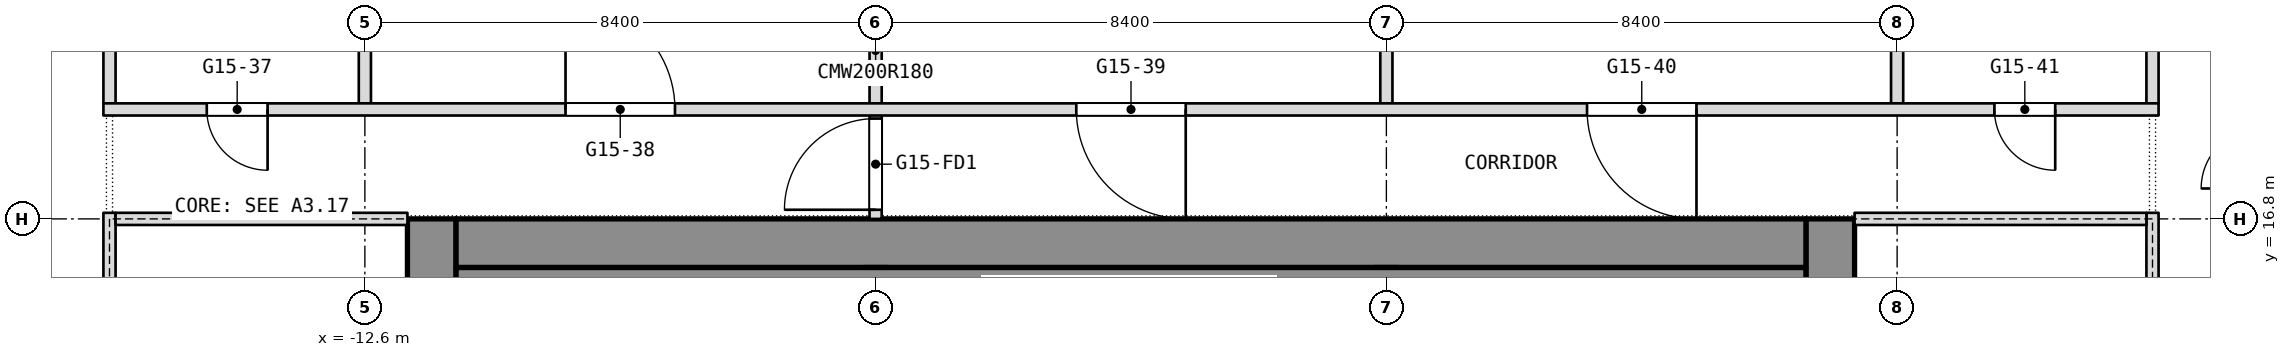
"""IFC4 building model, lengths in metres.
Left out: names, types, materials, properties, quantities, classifications, styles, units other than length and angle.
Written with IfcOpenShell. Run it as: python <this file> out.ifc"""

import sys

from ifc_helpers import new_model, si_unit, direction, frame, frame_2d, origin, place, context, subcontext, project, spatial, rectangle, extrude, element, fill, save


model = new_model("IFC4")
c1 = context("Model", 3, precision=1e-05, world=origin(), true_north=direction((0.0, 1.0)))
c2 = subcontext(c1, "Body", "Model", "MODEL_VIEW")
j1 = project(units=[si_unit("LENGTHUNIT", "METRE"), si_unit("PLANEANGLEUNIT", "RADIAN")], contexts=[c1])
p1 = place(None, origin())
s1 = spatial("IfcSite", under=j1, at=p1, CompositionType="ELEMENT")
p2 = place(p1, origin())
s2 = spatial("IfcBuilding", under=s1, at=p2, CompositionType="ELEMENT")
p3 = place(p2, frame((0.0, 0.0, 187.7)))
s3 = spatial("IfcBuildingStorey", under=s2, at=p3, CompositionType="ELEMENT", Elevation=187.7)
p4 = place(p3, frame((11.5, 0.0, 0.0), z_axis=(0.0, 0.0, 1.0), x_axis=(0.0, 1.0, 0.0)))
e1 = element("IfcWall", 1, at=p4, inside=s3, PredefinedType="SHEAR", context=c2, shape_type="SweptSolid", body=[
    extrude(rectangle(XDim=16.8, YDim=0.8, at=frame_2d((8.4, 0.0))), origin(), (0.0, 0.0, 1.0), 3.6),
])
p5 = place(p4, frame((2.3, 0.0, 0.0)))
e2 = element("IfcOpeningElement", 2, at=p5, cuts=e1, PredefinedType="OPENING", context=c2, shape_type="SweptSolid", body=[
    extrude(rectangle(XDim=1.1, YDim=2.1, at=frame_2d((0.55, 1.05))), frame((0.0, 0.4, 0.0), z_axis=(0.0, -1.0, 0.0), x_axis=(1.0, 0.0, 0.0)), (0.0, 0.0, 1.0), 0.8),
])
p6 = place(p4, frame((4.85, 0.0, 0.0)))
e3 = element("IfcOpeningElement", 3, at=p6, cuts=e1, PredefinedType="OPENING", context=c2, shape_type="SweptSolid", body=[
    extrude(rectangle(XDim=1.1, YDim=2.1, at=frame_2d((0.55, 1.05))), frame((0.0, 0.4, 0.0), z_axis=(0.0, -1.0, 0.0), x_axis=(1.0, 0.0, 0.0)), (0.0, 0.0, 1.0), 0.8),
])
p7 = place(p4, frame((6.825, 0.0, 0.0)))
e4 = element("IfcOpeningElement", 4, at=p7, cuts=e1, PredefinedType="OPENING", context=c2, shape_type="SweptSolid", body=[
    extrude(rectangle(XDim=1.2, YDim=2.1, at=frame_2d((0.6, 1.05))), frame((0.0, 0.4, 0.0), z_axis=(0.0, -1.0, 0.0), x_axis=(1.0, 0.0, 0.0)), (0.0, 0.0, 1.0), 0.8),
])
p8 = place(p4, frame((13.4, 0.0, 0.0)))
e5 = element("IfcOpeningElement", 5, at=p8, cuts=e1, PredefinedType="OPENING", context=c2, shape_type="SweptSolid", body=[
    extrude(rectangle(XDim=1.1, YDim=2.1, at=frame_2d((0.55, 1.05))), frame((0.0, 0.4, 0.0), z_axis=(0.0, -1.0, 0.0), x_axis=(1.0, 0.0, 0.0)), (0.0, 0.0, 1.0), 0.8),
])
p9 = place(p4, frame((10.85, 0.0, 0.0)))
e6 = element("IfcOpeningElement", 6, at=p9, cuts=e1, PredefinedType="OPENING", context=c2, shape_type="SweptSolid", body=[
    extrude(rectangle(XDim=1.1, YDim=2.1, at=frame_2d((0.55, 1.05))), frame((0.0, 0.4, 0.0), z_axis=(0.0, -1.0, 0.0), x_axis=(1.0, 0.0, 0.0)), (0.0, 0.0, 1.0), 0.8),
])
p10 = place(p4, frame((8.775, 0.0, 0.0)))
e7 = element("IfcOpeningElement", 7, at=p10, cuts=e1, PredefinedType="OPENING", context=c2, shape_type="SweptSolid", body=[
    extrude(rectangle(XDim=1.2, YDim=2.1, at=frame_2d((0.6, 1.05))), frame((0.0, 0.4, 0.0), z_axis=(0.0, -1.0, 0.0), x_axis=(1.0, 0.0, 0.0)), (0.0, 0.0, 1.0), 0.8),
])
p11 = place(p3, frame((-11.5, 0.0, 0.0), z_axis=(0.0, 0.0, 1.0), x_axis=(0.0, 1.0, 0.0)))
e8 = element("IfcWall", 8, at=p11, inside=s3, PredefinedType="SHEAR", context=c2, shape_type="SweptSolid", body=[
    extrude(rectangle(XDim=16.8, YDim=0.8, at=frame_2d((8.4, 0.0))), origin(), (0.0, 0.0, 1.0), 3.6),
])
p12 = place(p11, frame((3.6, 0.0, 0.0)))
e9 = element("IfcOpeningElement", 9, at=p12, cuts=e8, PredefinedType="OPENING", context=c2, shape_type="SweptSolid", body=[
    extrude(rectangle(XDim=0.9, YDim=2.1, at=frame_2d((0.45, 1.05))), frame((0.0, 0.4, 0.0), z_axis=(0.0, -1.0, 0.0), x_axis=(1.0, 0.0, 0.0)), (0.0, 0.0, 1.0), 0.8),
])
p13 = place(p11, frame((6.825, 0.0, 0.0)))
e10 = element("IfcOpeningElement", 10, at=p13, cuts=e8, PredefinedType="OPENING", context=c2, shape_type="SweptSolid", body=[
    extrude(rectangle(XDim=1.2, YDim=2.1, at=frame_2d((0.6, 1.05))), frame((0.0, 0.4, 0.0), z_axis=(0.0, -1.0, 0.0), x_axis=(1.0, 0.0, 0.0)), (0.0, 0.0, 1.0), 0.8),
])
p14 = place(p11, frame((14.212, 0.0, 0.0)))
e11 = element("IfcOpeningElement", 11, at=p14, cuts=e8, PredefinedType="OPENING", context=c2, shape_type="SweptSolid", body=[
    extrude(rectangle(XDim=0.9, YDim=2.1, at=frame_2d((0.45, 1.05))), frame((0.0, 0.4, 0.0), z_axis=(0.0, -1.0, 0.0), x_axis=(1.0, 0.0, 0.0)), (0.0, 0.0, 1.0), 0.8),
])
p15 = place(p11, frame((11.587, 0.0, 0.0)))
e12 = element("IfcOpeningElement", 12, at=p15, cuts=e8, PredefinedType="OPENING", context=c2, shape_type="SweptSolid", body=[
    extrude(rectangle(XDim=0.9, YDim=2.1, at=frame_2d((0.45, 1.05))), frame((0.0, 0.4, 0.0), z_axis=(0.0, -1.0, 0.0), x_axis=(1.0, 0.0, 0.0)), (0.0, 0.0, 1.0), 0.8),
])
p16 = place(p11, frame((8.775, 0.0, 0.0)))
e13 = element("IfcOpeningElement", 13, at=p16, cuts=e8, PredefinedType="OPENING", context=c2, shape_type="SweptSolid", body=[
    extrude(rectangle(XDim=1.2, YDim=2.1, at=frame_2d((0.6, 1.05))), frame((0.0, 0.4, 0.0), z_axis=(0.0, -1.0, 0.0), x_axis=(1.0, 0.0, 0.0)), (0.0, 0.0, 1.0), 0.8),
])
p17 = place(p3, frame((-11.1, 16.4, 0.0), z_axis=(0.0, 0.0, 1.0), x_axis=(1.0, 0.0, 0.0)))
e14 = element("IfcWall", 14, at=p17, inside=s3, PredefinedType="SHEAR", context=c2, shape_type="SweptSolid", body=[
    extrude(rectangle(XDim=22.2, YDim=0.8, at=frame_2d((11.1, 0.0))), origin(), (0.0, 0.0, 1.0), 3.6),
])
p18 = place(p3, frame((-4.2, 0.8, 0.0), z_axis=(0.0, 0.0, 1.0), x_axis=(0.0, 1.0, 0.0)))
e15 = element("IfcWall", 15, at=p18, inside=s3, PredefinedType="SHEAR", context=c2, shape_type="SweptSolid", body=[
    extrude(rectangle(XDim=15.2, YDim=0.4, at=frame_2d((7.6, 0.0))), origin(), (0.0, 0.0, 1.0), 3.6),
])
p19 = place(p18, frame((8.5, 0.0, 0.0)))
e16 = element("IfcOpeningElement", 16, at=p19, cuts=e15, PredefinedType="OPENING", context=c2, shape_type="SweptSolid", body=[
    extrude(rectangle(XDim=1.2, YDim=2.1, at=frame_2d((0.6, 1.05))), frame((0.0, 0.2, 0.0), z_axis=(0.0, -1.0, 0.0), x_axis=(1.0, 0.0, 0.0)), (0.0, 0.0, 1.0), 0.4),
])
p20 = place(p3, frame((4.2, 0.8, 0.0), z_axis=(0.0, 0.0, 1.0), x_axis=(0.0, 1.0, 0.0)))
e17 = element("IfcWall", 17, at=p20, inside=s3, PredefinedType="SHEAR", context=c2, shape_type="SweptSolid", body=[
    extrude(rectangle(XDim=15.2, YDim=0.4, at=frame_2d((7.6, 0.0))), origin(), (0.0, 0.0, 1.0), 3.6),
])
p21 = place(p20, frame((5.95, 0.0, 0.0)))
e18 = element("IfcOpeningElement", 18, at=p21, cuts=e17, PredefinedType="OPENING", context=c2, shape_type="SweptSolid", body=[
    extrude(rectangle(XDim=1.2, YDim=2.1, at=frame_2d((0.6, 1.05))), frame((0.0, 0.2, 0.0), z_axis=(0.0, -1.0, 0.0), x_axis=(1.0, 0.0, 0.0)), (0.0, 0.0, 1.0), 0.4),
])
for number, where, z_axis, x_axis in (
    (19, (16.8, 18.7, 0.0), (0.0, 0.0, 1.0), (0.0, 1.0, 0.0)),
    (20, (12.6, 18.7, 0.0), (0.0, 0.0, 1.0), (0.0, 1.0, 0.0)),
    (21, (4.2, 18.7, 0.0), (0.0, 0.0, 1.0), (0.0, 1.0, 0.0)),
):
    element("IfcWall", number, at=place(p3, frame(where, z_axis=z_axis, x_axis=x_axis)), inside=s3, PredefinedType="PARTITIONING", context=c2, shape_type="SweptSolid", body=[
        extrude(rectangle(XDim=3.64, YDim=0.2, at=frame_2d((1.82, 0.0))), origin(), (0.0, 0.0, 1.0), 3.34),
    ])
p22 = place(p3, frame((-4.2, 16.8, 0.0), z_axis=(0.0, 0.0, 1.0), x_axis=(0.0, 1.0, 0.0)))
e22 = element("IfcWall", 22, at=p22, inside=s3, PredefinedType="PARTITIONING", context=c2, shape_type="SweptSolid", body=[
    extrude(rectangle(XDim=5.54, YDim=0.2, at=frame_2d((2.77, 0.0))), origin(), (0.0, 0.0, 1.0), 3.34),
])
p23 = place(p22, frame((0.15, 0.0, 0.0)))
e23 = element("IfcOpeningElement", 23, at=p23, cuts=e22, PredefinedType="OPENING", context=c2, shape_type="SweptSolid", body=[
    extrude(rectangle(XDim=1.5, YDim=2.1, at=frame_2d((0.75, 1.05))), frame((0.0, 0.1, 0.0), z_axis=(0.0, -1.0, 0.0), x_axis=(1.0, 0.0, 0.0)), (0.0, 0.0, 1.0), 0.2),
])
for number, where, z_axis, x_axis in (
    (24, (-12.6, 18.7, 0.0), (0.0, 0.0, 1.0), (0.0, 1.0, 0.0)),
    (25, (-16.8, 18.7, 0.0), (0.0, 0.0, 1.0), (0.0, 1.0, 0.0)),
):
    element("IfcWall", number, at=place(p3, frame(where, z_axis=z_axis, x_axis=x_axis)), inside=s3, PredefinedType="PARTITIONING", context=c2, shape_type="SweptSolid", body=[
        extrude(rectangle(XDim=3.64, YDim=0.2, at=frame_2d((1.82, 0.0))), origin(), (0.0, 0.0, 1.0), 3.34),
    ])
p24 = place(p3, frame((-16.9, 18.6, 0.0), z_axis=(0.0, 0.0, 1.0), x_axis=(1.0, 0.0, 0.0)))
e26 = element("IfcWall", 26, at=p24, inside=s3, PredefinedType="PARTITIONING", context=c2, shape_type="SweptSolid", body=[
    extrude(rectangle(XDim=33.8, YDim=0.2, at=frame_2d((16.9, 0.0))), origin(), (0.0, 0.0, 1.0), 3.34),
])
p25 = place(p24, frame((1.7, 0.0, 0.0)))
e27 = element("IfcOpeningElement", 27, at=p25, cuts=e26, PredefinedType="OPENING", context=c2, shape_type="SweptSolid", body=[
    extrude(rectangle(XDim=1.0, YDim=2.1, at=frame_2d((0.5, 1.05))), frame((0.0, 0.1, 0.0), z_axis=(0.0, -1.0, 0.0), x_axis=(1.0, 0.0, 0.0)), (0.0, 0.0, 1.0), 0.2),
])
p26 = place(p24, frame((7.6, 0.0, 0.0)))
e28 = element("IfcOpeningElement", 28, at=p26, cuts=e26, PredefinedType="OPENING", context=c2, shape_type="SweptSolid", body=[
    extrude(rectangle(XDim=1.8, YDim=2.1, at=frame_2d((0.9, 1.05))), frame((0.0, 0.1, 0.0), z_axis=(0.0, -1.0, 0.0), x_axis=(1.0, 0.0, 0.0)), (0.0, 0.0, 1.0), 0.2),
])
p27 = place(p24, frame((16.0, 0.0, 0.0)))
e29 = element("IfcOpeningElement", 29, at=p27, cuts=e26, PredefinedType="OPENING", context=c2, shape_type="SweptSolid", body=[
    extrude(rectangle(XDim=1.8, YDim=2.1, at=frame_2d((0.9, 1.05))), frame((0.0, 0.1, 0.0), z_axis=(0.0, -1.0, 0.0), x_axis=(1.0, 0.0, 0.0)), (0.0, 0.0, 1.0), 0.2),
])
p28 = place(p24, frame((24.4, 0.0, 0.0)))
e30 = element("IfcOpeningElement", 30, at=p28, cuts=e26, PredefinedType="OPENING", context=c2, shape_type="SweptSolid", body=[
    extrude(rectangle(XDim=1.8, YDim=2.1, at=frame_2d((0.9, 1.05))), frame((0.0, 0.1, 0.0), z_axis=(0.0, -1.0, 0.0), x_axis=(1.0, 0.0, 0.0)), (0.0, 0.0, 1.0), 0.2),
])
p29 = place(p24, frame((31.1, 0.0, 0.0)))
e31 = element("IfcOpeningElement", 31, at=p29, cuts=e26, PredefinedType="OPENING", context=c2, shape_type="SweptSolid", body=[
    extrude(rectangle(XDim=1.0, YDim=2.1, at=frame_2d((0.5, 1.05))), frame((0.0, 0.1, 0.0), z_axis=(0.0, -1.0, 0.0), x_axis=(1.0, 0.0, 0.0)), (0.0, 0.0, 1.0), 0.2),
])
p30 = place(p3, frame((-11.1, 15.65, 0.0), z_axis=(0.0, 0.0, 1.0), x_axis=(1.0, 0.0, 0.0)))
e32 = element("IfcWall", 32, at=p30, inside=s3, PredefinedType="PARTITIONING", context=c2, shape_type="SweptSolid", body=[
    extrude(rectangle(XDim=22.2, YDim=0.7, at=frame_2d((11.1, 0.0))), origin(), (0.0, 0.0, 1.0), 3.34),
])
p31 = place(p3, frame((-16.8, -0.1, 0.0), z_axis=(0.0, 0.0, 1.0), x_axis=(0.0, 1.0, 0.0)))
e33 = element("IfcWall", 33, at=p31, inside=s3, PredefinedType="PARTITIONING", context=c2, shape_type="SweptSolid", body=[
    extrude(rectangle(XDim=17.0, YDim=0.2, at=frame_2d((8.5, 0.0))), origin(), (0.0, 0.0, 1.0), 3.34),
])
p32 = place(p31, frame((2.2, 0.0, 0.0)))
e34 = element("IfcOpeningElement", 34, at=p32, cuts=e33, PredefinedType="OPENING", context=c2, shape_type="SweptSolid", body=[
    extrude(rectangle(XDim=1.8, YDim=2.1, at=frame_2d((0.9, 1.05))), frame((0.0, 0.1, 0.0), z_axis=(0.0, -1.0, 0.0), x_axis=(1.0, 0.0, 0.0)), (0.0, 0.0, 1.0), 0.2),
])
p33 = place(p31, frame((13.0, 0.0, 0.0)))
e35 = element("IfcOpeningElement", 35, at=p33, cuts=e33, PredefinedType="OPENING", context=c2, shape_type="SweptSolid", body=[
    extrude(rectangle(XDim=1.8, YDim=2.1, at=frame_2d((0.9, 1.05))), frame((0.0, 0.1, 0.0), z_axis=(0.0, -1.0, 0.0), x_axis=(1.0, 0.0, 0.0)), (0.0, 0.0, 1.0), 0.2),
])
p34 = place(p3, frame((-16.7, 16.8, 0.0), z_axis=(0.0, 0.0, 1.0), x_axis=(1.0, 0.0, 0.0)))
e36 = element("IfcWall", 36, at=p34, inside=s3, PredefinedType="PARTITIONING", context=c2, shape_type="SweptSolid", body=[
    extrude(rectangle(XDim=4.8, YDim=0.2, at=frame_2d((2.4, 0.0))), origin(), (0.0, 0.0, 1.0), 2.94),
])
p35 = place(p3, frame((16.8, -0.1, 0.0), z_axis=(0.0, 0.0, 1.0), x_axis=(0.0, 1.0, 0.0)))
e37 = element("IfcWall", 37, at=p35, inside=s3, PredefinedType="PARTITIONING", context=c2, shape_type="SweptSolid", body=[
    extrude(rectangle(XDim=17.0, YDim=0.2, at=frame_2d((8.5, 0.0))), origin(), (0.0, 0.0, 1.0), 3.34),
])
p36 = place(p35, frame((2.2, 0.0, 0.0)))
e38 = element("IfcOpeningElement", 38, at=p36, cuts=e37, PredefinedType="OPENING", context=c2, shape_type="SweptSolid", body=[
    extrude(rectangle(XDim=1.8, YDim=2.1, at=frame_2d((0.9, 1.05))), frame((0.0, 0.1, 0.0), z_axis=(0.0, -1.0, 0.0), x_axis=(1.0, 0.0, 0.0)), (0.0, 0.0, 1.0), 0.2),
])
p37 = place(p35, frame((13.0, 0.0, 0.0)))
e39 = element("IfcOpeningElement", 39, at=p37, cuts=e37, PredefinedType="OPENING", context=c2, shape_type="SweptSolid", body=[
    extrude(rectangle(XDim=1.8, YDim=2.1, at=frame_2d((0.9, 1.05))), frame((0.0, 0.1, 0.0), z_axis=(0.0, -1.0, 0.0), x_axis=(1.0, 0.0, 0.0)), (0.0, 0.0, 1.0), 0.2),
])
p38 = place(p3, frame((11.9, 16.8, 0.0), z_axis=(0.0, 0.0, 1.0), x_axis=(1.0, 0.0, 0.0)))
e40 = element("IfcWall", 40, at=p38, inside=s3, PredefinedType="PARTITIONING", context=c2, shape_type="SweptSolid", body=[
    extrude(rectangle(XDim=4.8, YDim=0.2, at=frame_2d((2.4, 0.0))), origin(), (0.0, 0.0, 1.0), 2.94),
])
p39 = place(p25, origin())
e41 = element("IfcDoor", 41, at=p39, inside=s3, OperationType="SINGLE_SWING_LEFT", PredefinedType="DOOR", context=c2, shape_type="SweptSolid", body=[
    extrude(rectangle(XDim=1.0, YDim=2.1, at=frame_2d((0.5, 1.05))), frame((0.0, 0.025, 0.0), z_axis=(0.0, -1.0, 0.0), x_axis=(1.0, 0.0, 0.0)), (0.0, 0.0, 1.0), 0.05),
])
fill(e27, e41)
p40 = place(p26, origin())
e42 = element("IfcDoor", 42, at=p40, inside=s3, OperationType="DOUBLE_DOOR_SINGLE_SWING", PredefinedType="DOOR", context=c2, shape_type="SweptSolid", body=[
    extrude(rectangle(XDim=1.8, YDim=2.1, at=frame_2d((0.9, 1.05))), frame((0.0, 0.025, 0.0), z_axis=(0.0, -1.0, 0.0), x_axis=(1.0, 0.0, 0.0)), (0.0, 0.0, 1.0), 0.05),
])
fill(e28, e42)
p41 = place(p27, origin())
e43 = element("IfcDoor", 43, at=p41, inside=s3, OperationType="DOUBLE_DOOR_SINGLE_SWING", PredefinedType="DOOR", context=c2, shape_type="SweptSolid", body=[
    extrude(rectangle(XDim=1.8, YDim=2.1, at=frame_2d((0.9, 1.05))), frame((0.0, 0.025, 0.0), z_axis=(0.0, -1.0, 0.0), x_axis=(1.0, 0.0, 0.0)), (0.0, 0.0, 1.0), 0.05),
])
fill(e29, e43)
p42 = place(p28, origin())
e44 = element("IfcDoor", 44, at=p42, inside=s3, OperationType="DOUBLE_DOOR_SINGLE_SWING", PredefinedType="DOOR", context=c2, shape_type="SweptSolid", body=[
    extrude(rectangle(XDim=1.8, YDim=2.1, at=frame_2d((0.9, 1.05))), frame((0.0, 0.025, 0.0), z_axis=(0.0, -1.0, 0.0), x_axis=(1.0, 0.0, 0.0)), (0.0, 0.0, 1.0), 0.05),
])
fill(e30, e44)
p43 = place(p29, origin())
e45 = element("IfcDoor", 45, at=p43, inside=s3, OperationType="SINGLE_SWING_LEFT", PredefinedType="DOOR", context=c2, shape_type="SweptSolid", body=[
    extrude(rectangle(XDim=1.0, YDim=2.1, at=frame_2d((0.5, 1.05))), frame((0.0, 0.025, 0.0), z_axis=(0.0, -1.0, 0.0), x_axis=(1.0, 0.0, 0.0)), (0.0, 0.0, 1.0), 0.05),
])
fill(e31, e45)
p44 = place(p23, origin())
e46 = element("IfcDoor", 46, at=p44, inside=s3, OperationType="DOUBLE_DOOR_DOUBLE_SWING", PredefinedType="DOOR", context=c2, shape_type="SweptSolid", body=[
    extrude(rectangle(XDim=1.5, YDim=2.1, at=frame_2d((0.75, 1.05))), frame((0.0, 0.025, 0.0), z_axis=(0.0, -1.0, 0.0), x_axis=(1.0, 0.0, 0.0)), (0.0, 0.0, 1.0), 0.05),
])
fill(e23, e46)
save(model, sys.argv[1])
